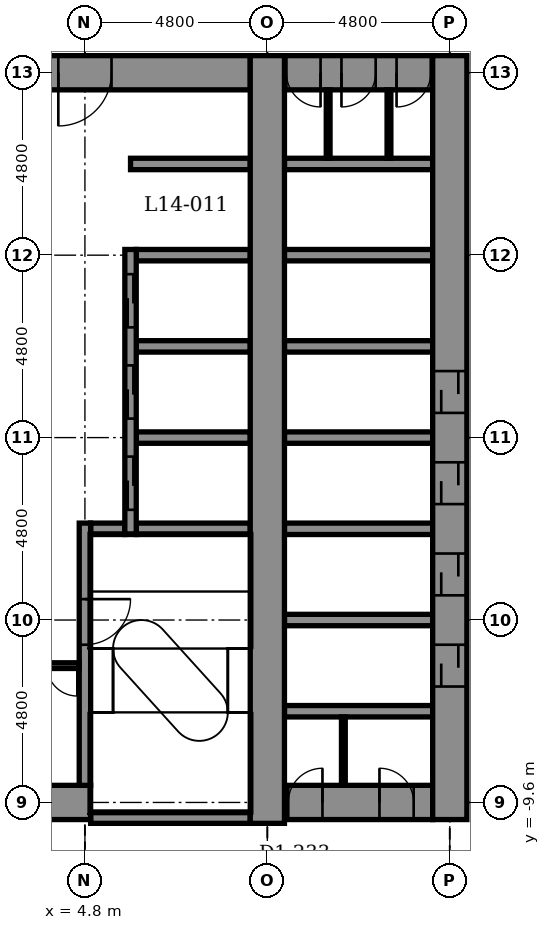
"""IFC4 building model, lengths in metres.
Left out: names, types, materials, properties, quantities, classifications, styles, units other than length and angle.
Written with IfcOpenShell. Run it as: python <this file> out.ifc"""

import sys

from ifc_helpers import new_model, si_unit, direction, frame, frame_2d, origin, place, context, subcontext, project, spatial, rectangle, extrude, element, fill, save


model = new_model("IFC4")
c1 = context("Model", 3, precision=1e-05, world=origin(), true_north=direction((0.0, 1.0)))
c2 = subcontext(c1, "Body", "Model", "MODEL_VIEW")
j1 = project(units=[si_unit("LENGTHUNIT", "METRE"), si_unit("PLANEANGLEUNIT", "RADIAN")], contexts=[c1])
p1 = place(None, origin())
s1 = spatial("IfcSite", under=j1, at=p1, CompositionType="ELEMENT")
p2 = place(p1, origin())
s2 = spatial("IfcBuilding", under=s1, at=p2, CompositionType="ELEMENT")
p3 = place(p2, frame((0.0, 0.0, 77.9)))
s3 = spatial("IfcBuildingStorey", under=s2, at=p3, CompositionType="ELEMENT", Elevation=77.9)
p4 = place(p3, frame((4.95, -10.0, -0.2), z_axis=(0.0, 0.0, 1.0), x_axis=(1.0, 0.0, 0.0)))
e1 = element("IfcWall", 1, at=p4, inside=s3, PredefinedType="STANDARD", context=c2, shape_type="SweptSolid", body=[
    extrude(rectangle(XDim=4.2, YDim=0.3, at=frame_2d((2.1, 0.0))), origin(), (0.0, 0.0, 1.0), 4.5),
])
p5 = place(p3, frame((-5.25, -9.6, -0.2), z_axis=(0.0, 0.0, 1.0), x_axis=(1.0, 0.0, 0.0)))
e2 = element("IfcWall", 2, at=p5, inside=s3, PredefinedType="SHEAR", context=c2, shape_type="SweptSolid", body=[
    extrude(rectangle(XDim=10.2, YDim=0.9, at=frame_2d((5.1, 0.0))), origin(), (0.0, 0.0, 1.0), 4.5),
])
p6 = place(p5, frame((0.6, 0.0, 0.2)))
e3 = element("IfcOpeningElement", 3, at=p6, cuts=e2, PredefinedType="OPENING", context=c2, shape_type="SweptSolid", body=[
    extrude(rectangle(XDim=0.9, YDim=2.1, at=frame_2d((0.45, 1.05))), frame((0.0, 0.46, 0.0), z_axis=(0.0, -1.0, 0.0), x_axis=(1.0, 0.0, 0.0)), (0.0, 0.0, 1.0), 0.92),
])
p7 = place(p3, frame((10.05, -9.6, -0.2), z_axis=(0.0, 0.0, 1.0), x_axis=(1.0, 0.0, 0.0)))
e4 = element("IfcWall", 4, at=p7, inside=s3, PredefinedType="SHEAR", context=c2, shape_type="SweptSolid", body=[
    extrude(rectangle(XDim=3.9, YDim=0.9, at=frame_2d((1.95, 0.0))), origin(), (0.0, 0.0, 1.0), 4.5),
])
p8 = place(p7, frame((0.1, 0.0, 0.2)))
e5 = element("IfcOpeningElement", 5, at=p8, cuts=e4, PredefinedType="OPENING", context=c2, shape_type="SweptSolid", body=[
    extrude(rectangle(XDim=0.9, YDim=2.1, at=frame_2d((0.45, 1.05))), frame((0.0, 0.46, 0.0), z_axis=(0.0, -1.0, 0.0), x_axis=(1.0, 0.0, 0.0)), (0.0, 0.0, 1.0), 0.92),
])
p9 = place(p7, frame((2.5, 0.0, 0.2)))
e6 = element("IfcOpeningElement", 6, at=p9, cuts=e4, PredefinedType="OPENING", context=c2, shape_type="SweptSolid", body=[
    extrude(rectangle(XDim=0.9, YDim=2.1, at=frame_2d((0.45, 1.05))), frame((0.0, 0.46, 0.0), z_axis=(0.0, -1.0, 0.0), x_axis=(1.0, 0.0, 0.0)), (0.0, 0.0, 1.0), 0.92),
])
for number, where, z_axis, x_axis in (
    (7, (10.05, -7.2, -0.2), (0.0, 0.0, 1.0), (1.0, 0.0, 0.0)),
    (8, (10.05, -4.8, -0.2), (0.0, 0.0, 1.0), (1.0, 0.0, 0.0)),
):
    element("IfcWall", number, at=place(p3, frame(where, z_axis=z_axis, x_axis=x_axis)), inside=s3, PredefinedType="STANDARD", context=c2, shape_type="SweptSolid", body=[
        extrude(rectangle(XDim=3.9, YDim=0.3, at=frame_2d((1.95, 0.0))), origin(), (0.0, 0.0, 1.0), 4.5),
    ])
p10 = place(p3, frame((4.95, -2.4, -0.2), z_axis=(0.0, 0.0, 1.0), x_axis=(1.0, 0.0, 0.0)))
e9 = element("IfcWall", 9, at=p10, inside=s3, PredefinedType="STANDARD", context=c2, shape_type="SweptSolid", body=[
    extrude(rectangle(XDim=0.9, YDim=0.3, at=frame_2d((0.45, 0.0))), origin(), (0.0, 0.0, 1.0), 4.5),
])
p11 = place(p3, frame((6.15, -2.4, -0.2), z_axis=(0.0, 0.0, 1.0), x_axis=(1.0, 0.0, 0.0)))
e10 = element("IfcWall", 10, at=p11, inside=s3, PredefinedType="STANDARD", context=c2, shape_type="SweptSolid", body=[
    extrude(rectangle(XDim=3.0, YDim=0.3, at=frame_2d((1.5, 0.0))), origin(), (0.0, 0.0, 1.0), 4.5),
])
p12 = place(p3, frame((10.05, -2.4, -0.2), z_axis=(0.0, 0.0, 1.0), x_axis=(1.0, 0.0, 0.0)))
e11 = element("IfcWall", 11, at=p12, inside=s3, PredefinedType="STANDARD", context=c2, shape_type="SweptSolid", body=[
    extrude(rectangle(XDim=3.9, YDim=0.3, at=frame_2d((1.95, 0.0))), origin(), (0.0, 0.0, 1.0), 4.5),
])
p13 = place(p3, frame((6.15, 0.0, -0.2), z_axis=(0.0, 0.0, 1.0), x_axis=(1.0, 0.0, 0.0)))
e12 = element("IfcWall", 12, at=p13, inside=s3, PredefinedType="STANDARD", context=c2, shape_type="SweptSolid", body=[
    extrude(rectangle(XDim=3.0, YDim=0.3, at=frame_2d((1.5, 0.0))), origin(), (0.0, 0.0, 1.0), 4.5),
])
p14 = place(p3, frame((10.05, 0.0, -0.2), z_axis=(0.0, 0.0, 1.0), x_axis=(1.0, 0.0, 0.0)))
e13 = element("IfcWall", 13, at=p14, inside=s3, PredefinedType="STANDARD", context=c2, shape_type="SweptSolid", body=[
    extrude(rectangle(XDim=3.9, YDim=0.3, at=frame_2d((1.95, 0.0))), origin(), (0.0, 0.0, 1.0), 4.5),
])
p15 = place(p3, frame((6.15, 2.4, -0.2), z_axis=(0.0, 0.0, 1.0), x_axis=(1.0, 0.0, 0.0)))
e14 = element("IfcWall", 14, at=p15, inside=s3, PredefinedType="STANDARD", context=c2, shape_type="SweptSolid", body=[
    extrude(rectangle(XDim=3.0, YDim=0.3, at=frame_2d((1.5, 0.0))), origin(), (0.0, 0.0, 1.0), 4.5),
])
p16 = place(p3, frame((10.05, 2.4, -0.2), z_axis=(0.0, 0.0, 1.0), x_axis=(1.0, 0.0, 0.0)))
e15 = element("IfcWall", 15, at=p16, inside=s3, PredefinedType="STANDARD", context=c2, shape_type="SweptSolid", body=[
    extrude(rectangle(XDim=3.9, YDim=0.3, at=frame_2d((1.95, 0.0))), origin(), (0.0, 0.0, 1.0), 4.5),
])
p17 = place(p3, frame((6.15, 4.8, -0.2), z_axis=(0.0, 0.0, 1.0), x_axis=(1.0, 0.0, 0.0)))
e16 = element("IfcWall", 16, at=p17, inside=s3, PredefinedType="STANDARD", context=c2, shape_type="SweptSolid", body=[
    extrude(rectangle(XDim=3.0, YDim=0.3, at=frame_2d((1.5, 0.0))), origin(), (0.0, 0.0, 1.0), 4.5),
])
p18 = place(p3, frame((10.05, 4.8, -0.2), z_axis=(0.0, 0.0, 1.0), x_axis=(1.0, 0.0, 0.0)))
e17 = element("IfcWall", 17, at=p18, inside=s3, PredefinedType="STANDARD", context=c2, shape_type="SweptSolid", body=[
    extrude(rectangle(XDim=3.9, YDim=0.3, at=frame_2d((1.95, 0.0))), origin(), (0.0, 0.0, 1.0), 4.5),
])
p19 = place(p3, frame((6.0, 7.2, -0.2), z_axis=(0.0, 0.0, 1.0), x_axis=(1.0, 0.0, 0.0)))
e18 = element("IfcWall", 18, at=p19, inside=s3, PredefinedType="STANDARD", context=c2, shape_type="SweptSolid", body=[
    extrude(rectangle(XDim=3.15, YDim=0.3, at=frame_2d((1.575, 0.0))), origin(), (0.0, 0.0, 1.0), 4.5),
])
p20 = place(p3, frame((10.05, 7.2, -0.2), z_axis=(0.0, 0.0, 1.0), x_axis=(1.0, 0.0, 0.0)))
e19 = element("IfcWall", 19, at=p20, inside=s3, PredefinedType="STANDARD", context=c2, shape_type="SweptSolid", body=[
    extrude(rectangle(XDim=3.9, YDim=0.3, at=frame_2d((1.95, 0.0))), origin(), (0.0, 0.0, 1.0), 4.5),
])
p21 = place(p3, frame((-5.25, 9.6, -0.2), z_axis=(0.0, 0.0, 1.0), x_axis=(1.0, 0.0, 0.0)))
e20 = element("IfcWall", 20, at=p21, inside=s3, PredefinedType="SHEAR", context=c2, shape_type="SweptSolid", body=[
    extrude(rectangle(XDim=14.4, YDim=0.9, at=frame_2d((7.2, 0.0))), origin(), (0.0, 0.0, 1.0), 4.5),
])
p22 = place(p21, frame((9.35, 0.0, 0.2)))
e21 = element("IfcOpeningElement", 21, at=p22, cuts=e20, PredefinedType="OPENING", context=c2, shape_type="SweptSolid", body=[
    extrude(rectangle(XDim=1.4, YDim=2.1, at=frame_2d((0.7, 1.05))), frame((0.0, 0.46, 0.0), z_axis=(0.0, -1.0, 0.0), x_axis=(1.0, 0.0, 0.0)), (0.0, 0.0, 1.0), 0.92),
])
p23 = place(p3, frame((10.05, 9.6, -0.2), z_axis=(0.0, 0.0, 1.0), x_axis=(1.0, 0.0, 0.0)))
e22 = element("IfcWall", 22, at=p23, inside=s3, PredefinedType="SHEAR", context=c2, shape_type="SweptSolid", body=[
    extrude(rectangle(XDim=3.9, YDim=0.9, at=frame_2d((1.95, 0.0))), origin(), (0.0, 0.0, 1.0), 4.5),
])
p24 = place(p23, frame((0.05, 0.0, 0.2)))
e23 = element("IfcOpeningElement", 23, at=p24, cuts=e22, PredefinedType="OPENING", context=c2, shape_type="SweptSolid", body=[
    extrude(rectangle(XDim=0.9, YDim=2.1, at=frame_2d((0.45, 1.05))), frame((0.0, 0.46, 0.0), z_axis=(0.0, -1.0, 0.0), x_axis=(1.0, 0.0, 0.0)), (0.0, 0.0, 1.0), 0.92),
])
p25 = place(p23, frame((1.5, 0.0, 0.2)))
e24 = element("IfcOpeningElement", 24, at=p25, cuts=e22, PredefinedType="OPENING", context=c2, shape_type="SweptSolid", body=[
    extrude(rectangle(XDim=0.9, YDim=2.1, at=frame_2d((0.45, 1.05))), frame((0.0, 0.46, 0.0), z_axis=(0.0, -1.0, 0.0), x_axis=(1.0, 0.0, 0.0)), (0.0, 0.0, 1.0), 0.92),
])
p26 = place(p23, frame((2.95, 0.0, 0.2)))
e25 = element("IfcOpeningElement", 25, at=p26, cuts=e22, PredefinedType="OPENING", context=c2, shape_type="SweptSolid", body=[
    extrude(rectangle(XDim=0.9, YDim=2.1, at=frame_2d((0.45, 1.05))), frame((0.0, 0.46, 0.0), z_axis=(0.0, -1.0, 0.0), x_axis=(1.0, 0.0, 0.0)), (0.0, 0.0, 1.0), 0.92),
])
p27 = place(p3, frame((4.8, -9.15, -0.2), z_axis=(0.0, 0.0, 1.0), x_axis=(0.0, 1.0, 0.0)))
e26 = element("IfcWall", 26, at=p27, inside=s3, PredefinedType="STANDARD", context=c2, shape_type="SweptSolid", body=[
    extrude(rectangle(XDim=6.9, YDim=0.3, at=frame_2d((3.45, 0.0))), origin(), (0.0, 0.0, 1.0), 4.5),
])
p28 = place(p27, frame((3.7, 0.0, 0.2)))
e27 = element("IfcOpeningElement", 27, at=p28, cuts=e26, PredefinedType="OPENING", context=c2, shape_type="SweptSolid", body=[
    extrude(rectangle(XDim=1.2, YDim=2.1, at=frame_2d((0.6, 1.05))), frame((0.0, 0.16, 0.0), z_axis=(0.0, -1.0, 0.0), x_axis=(1.0, 0.0, 0.0)), (0.0, 0.0, 1.0), 0.32),
])
p29 = place(p3, frame((6.0, -2.55, -0.2), z_axis=(0.0, 0.0, 1.0), x_axis=(0.0, 1.0, 0.0)))
e28 = element("IfcWall", 28, at=p29, inside=s3, PredefinedType="STANDARD", context=c2, shape_type="SweptSolid", body=[
    extrude(rectangle(XDim=7.5, YDim=0.3, at=frame_2d((3.75, 0.0))), origin(), (0.0, 0.0, 1.0), 4.5),
])
p30 = place(p29, frame((0.65, 0.0, 0.2)))
e29 = element("IfcOpeningElement", 29, at=p30, cuts=e28, PredefinedType="OPENING", context=c2, shape_type="SweptSolid", body=[
    extrude(rectangle(XDim=1.4, YDim=2.1, at=frame_2d((0.7, 1.05))), frame((0.0, 0.16, 0.0), z_axis=(0.0, -1.0, 0.0), x_axis=(1.0, 0.0, 0.0)), (0.0, 0.0, 1.0), 0.32),
])
p31 = place(p29, frame((3.05, 0.0, 0.2)))
e30 = element("IfcOpeningElement", 30, at=p31, cuts=e28, PredefinedType="OPENING", context=c2, shape_type="SweptSolid", body=[
    extrude(rectangle(XDim=1.4, YDim=2.1, at=frame_2d((0.7, 1.05))), frame((0.0, 0.16, 0.0), z_axis=(0.0, -1.0, 0.0), x_axis=(1.0, 0.0, 0.0)), (0.0, 0.0, 1.0), 0.32),
])
p32 = place(p29, frame((5.45, 0.0, 0.2)))
e31 = element("IfcOpeningElement", 31, at=p32, cuts=e28, PredefinedType="OPENING", context=c2, shape_type="SweptSolid", body=[
    extrude(rectangle(XDim=1.4, YDim=2.1, at=frame_2d((0.7, 1.05))), frame((0.0, 0.16, 0.0), z_axis=(0.0, -1.0, 0.0), x_axis=(1.0, 0.0, 0.0)), (0.0, 0.0, 1.0), 0.32),
])
p33 = place(p3, frame((9.6, -10.15, -0.2), z_axis=(0.0, 0.0, 1.0), x_axis=(0.0, 1.0, 0.0)))
e32 = element("IfcWall", 32, at=p33, inside=s3, PredefinedType="SHEAR", context=c2, shape_type="SweptSolid", body=[
    extrude(rectangle(XDim=20.2, YDim=0.9, at=frame_2d((10.1, 0.0))), origin(), (0.0, 0.0, 1.0), 4.5),
])
p34 = place(p3, frame((14.4, -10.05, -0.2), z_axis=(0.0, 0.0, 1.0), x_axis=(0.0, 1.0, 0.0)))
e33 = element("IfcWall", 33, at=p34, inside=s3, PredefinedType="SHEAR", context=c2, shape_type="SweptSolid", body=[
    extrude(rectangle(XDim=20.1, YDim=0.9, at=frame_2d((10.05, 0.0))), origin(), (0.0, 0.0, 1.0), 4.5),
])
p35 = place(p34, frame((3.5, 0.0, 0.2)))
e34 = element("IfcOpeningElement", 34, at=p35, cuts=e33, PredefinedType="OPENING", context=c2, shape_type="SweptSolid", body=[
    extrude(rectangle(XDim=1.1, YDim=2.1, at=frame_2d((0.55, 1.05))), frame((0.0, 0.46, 0.0), z_axis=(0.0, -1.0, 0.0), x_axis=(1.0, 0.0, 0.0)), (0.0, 0.0, 1.0), 0.92),
])
p36 = place(p34, frame((5.9, 0.0, 0.2)))
e35 = element("IfcOpeningElement", 35, at=p36, cuts=e33, PredefinedType="OPENING", context=c2, shape_type="SweptSolid", body=[
    extrude(rectangle(XDim=1.1, YDim=2.1, at=frame_2d((0.55, 1.05))), frame((0.0, 0.46, 0.0), z_axis=(0.0, -1.0, 0.0), x_axis=(1.0, 0.0, 0.0)), (0.0, 0.0, 1.0), 0.92),
])
p37 = place(p34, frame((8.3, 0.0, 0.2)))
e36 = element("IfcOpeningElement", 36, at=p37, cuts=e33, PredefinedType="OPENING", context=c2, shape_type="SweptSolid", body=[
    extrude(rectangle(XDim=1.1, YDim=2.1, at=frame_2d((0.55, 1.05))), frame((0.0, 0.46, 0.0), z_axis=(0.0, -1.0, 0.0), x_axis=(1.0, 0.0, 0.0)), (0.0, 0.0, 1.0), 0.92),
])
p38 = place(p34, frame((10.7, 0.0, 0.2)))
e37 = element("IfcOpeningElement", 37, at=p38, cuts=e33, PredefinedType="OPENING", context=c2, shape_type="SweptSolid", body=[
    extrude(rectangle(XDim=1.1, YDim=2.1, at=frame_2d((0.55, 1.05))), frame((0.0, 0.46, 0.0), z_axis=(0.0, -1.0, 0.0), x_axis=(1.0, 0.0, 0.0)), (0.0, 0.0, 1.0), 0.92),
])
for number, where, z_axis, x_axis in (
    (38, (12.8, 7.35, 0.0), (0.0, 0.0, 1.0), (0.0, 1.0, 0.0)),
    (39, (11.6, -9.15, 0.0), (0.0, 0.0, 1.0), (0.0, 1.0, 0.0)),
    (40, (11.2, 7.35, 0.0), (0.0, 0.0, 1.0), (0.0, 1.0, 0.0)),
):
    element("IfcWall", number, at=place(p3, frame(where, z_axis=z_axis, x_axis=x_axis)), inside=s3, PredefinedType="PARTITIONING", context=c2, shape_type="SweptSolid", body=[
        extrude(rectangle(XDim=1.8, YDim=0.1, at=frame_2d((0.9, 0.0))), origin(), (0.0, 0.0, 1.0), 4.3),
    ])
p39 = place(p3, frame((3.75, -6.0, 0.0), z_axis=(0.0, 0.0, 1.0), x_axis=(1.0, 0.0, 0.0)))
e41 = element("IfcWall", 41, at=p39, inside=s3, PredefinedType="PARTITIONING", context=c2, shape_type="SweptSolid", body=[
    extrude(rectangle(XDim=0.9, YDim=0.15, at=frame_2d((0.45, 0.0))), origin(), (0.0, 0.0, 1.0), 4.3),
])
p40 = place(p39, frame((0.05, 0.0, 0.0)))
e42 = element("IfcOpeningElement", 42, at=p40, cuts=e41, PredefinedType="OPENING", context=c2, shape_type="SweptSolid", body=[
    extrude(rectangle(XDim=0.8, YDim=2.1, at=frame_2d((0.4, 1.05))), frame((0.0, 0.085, 0.0), z_axis=(0.0, -1.0, 0.0), x_axis=(1.0, 0.0, 0.0)), (0.0, 0.0, 1.0), 0.17),
])
p41 = place(p40, frame((0.8, 0.0, 0.0), z_axis=(0.0, 0.0, 1.0), x_axis=(-1.0, 0.0, 0.0)))
e43 = element("IfcDoor", 43, at=p41, inside=s3, OperationType="SINGLE_SWING_RIGHT", PredefinedType="DOOR", context=c2, shape_type="SweptSolid", body=[
    extrude(rectangle(XDim=0.8, YDim=2.1, at=frame_2d((0.4, 1.05))), frame((0.0, 0.025, 0.0), z_axis=(0.0, -1.0, 0.0), x_axis=(1.0, 0.0, 0.0)), (0.0, 0.0, 1.0), 0.05),
])
fill(e42, e43)
p42 = place(p30, origin())
e44 = element("IfcDoor", 44, at=p42, inside=s3, OperationType="DOUBLE_DOOR_SLIDING", PredefinedType="DOOR", context=c2, shape_type="SweptSolid", body=[
    extrude(rectangle(XDim=1.4, YDim=2.1, at=frame_2d((0.7, 1.05))), frame((0.0, 0.025, 0.0), z_axis=(0.0, -1.0, 0.0), x_axis=(1.0, 0.0, 0.0)), (0.0, 0.0, 1.0), 0.05),
])
fill(e29, e44)
p43 = place(p31, origin())
e45 = element("IfcDoor", 45, at=p43, inside=s3, OperationType="DOUBLE_DOOR_SLIDING", PredefinedType="DOOR", context=c2, shape_type="SweptSolid", body=[
    extrude(rectangle(XDim=1.4, YDim=2.1, at=frame_2d((0.7, 1.05))), frame((0.0, 0.025, 0.0), z_axis=(0.0, -1.0, 0.0), x_axis=(1.0, 0.0, 0.0)), (0.0, 0.0, 1.0), 0.05),
])
fill(e30, e45)
p44 = place(p32, origin())
e46 = element("IfcDoor", 46, at=p44, inside=s3, OperationType="DOUBLE_DOOR_SLIDING", PredefinedType="DOOR", context=c2, shape_type="SweptSolid", body=[
    extrude(rectangle(XDim=1.4, YDim=2.1, at=frame_2d((0.7, 1.05))), frame((0.0, 0.025, 0.0), z_axis=(0.0, -1.0, 0.0), x_axis=(1.0, 0.0, 0.0)), (0.0, 0.0, 1.0), 0.05),
])
fill(e31, e46)
p45 = place(p35, origin())
e47 = element("IfcDoor", 47, at=p45, inside=s3, OperationType="DOUBLE_DOOR_SLIDING", PredefinedType="DOOR", context=c2, shape_type="SweptSolid", body=[
    extrude(rectangle(XDim=1.1, YDim=2.1, at=frame_2d((0.55, 1.05))), frame((0.0, 0.025, 0.0), z_axis=(0.0, -1.0, 0.0), x_axis=(1.0, 0.0, 0.0)), (0.0, 0.0, 1.0), 0.05),
])
fill(e34, e47)
p46 = place(p36, origin())
e48 = element("IfcDoor", 48, at=p46, inside=s3, OperationType="DOUBLE_DOOR_SLIDING", PredefinedType="DOOR", context=c2, shape_type="SweptSolid", body=[
    extrude(rectangle(XDim=1.1, YDim=2.1, at=frame_2d((0.55, 1.05))), frame((0.0, 0.025, 0.0), z_axis=(0.0, -1.0, 0.0), x_axis=(1.0, 0.0, 0.0)), (0.0, 0.0, 1.0), 0.05),
])
fill(e35, e48)
p47 = place(p37, origin())
e49 = element("IfcDoor", 49, at=p47, inside=s3, OperationType="DOUBLE_DOOR_SLIDING", PredefinedType="DOOR", context=c2, shape_type="SweptSolid", body=[
    extrude(rectangle(XDim=1.1, YDim=2.1, at=frame_2d((0.55, 1.05))), frame((0.0, 0.025, 0.0), z_axis=(0.0, -1.0, 0.0), x_axis=(1.0, 0.0, 0.0)), (0.0, 0.0, 1.0), 0.05),
])
fill(e36, e49)
p48 = place(p38, origin())
e50 = element("IfcDoor", 50, at=p48, inside=s3, OperationType="DOUBLE_DOOR_SLIDING", PredefinedType="DOOR", context=c2, shape_type="SweptSolid", body=[
    extrude(rectangle(XDim=1.1, YDim=2.1, at=frame_2d((0.55, 1.05))), frame((0.0, 0.025, 0.0), z_axis=(0.0, -1.0, 0.0), x_axis=(1.0, 0.0, 0.0)), (0.0, 0.0, 1.0), 0.05),
])
fill(e37, e50)
p49 = place(p28, frame((1.2, 0.0, 0.0), z_axis=(0.0, 0.0, 1.0), x_axis=(-1.0, 0.0, 0.0)))
e51 = element("IfcDoor", 51, at=p49, inside=s3, OperationType="SINGLE_SWING_RIGHT", PredefinedType="DOOR", context=c2, shape_type="SweptSolid", body=[
    extrude(rectangle(XDim=1.2, YDim=2.1, at=frame_2d((0.6, 1.05))), frame((0.0, 0.025, 0.0), z_axis=(0.0, -1.0, 0.0), x_axis=(1.0, 0.0, 0.0)), (0.0, 0.0, 1.0), 0.05),
])
fill(e27, e51)
p50 = place(p8, origin())
e52 = element("IfcDoor", 52, at=p50, inside=s3, OperationType="SINGLE_SWING_RIGHT", PredefinedType="DOOR", context=c2, shape_type="SweptSolid", body=[
    extrude(rectangle(XDim=0.9, YDim=2.1, at=frame_2d((0.45, 1.05))), frame((0.0, 0.025, 0.0), z_axis=(0.0, -1.0, 0.0), x_axis=(1.0, 0.0, 0.0)), (0.0, 0.0, 1.0), 0.05),
])
fill(e5, e52)
p51 = place(p9, origin())
e53 = element("IfcDoor", 53, at=p51, inside=s3, OperationType="SINGLE_SWING_LEFT", PredefinedType="DOOR", context=c2, shape_type="SweptSolid", body=[
    extrude(rectangle(XDim=0.9, YDim=2.1, at=frame_2d((0.45, 1.05))), frame((0.0, 0.025, 0.0), z_axis=(0.0, -1.0, 0.0), x_axis=(1.0, 0.0, 0.0)), (0.0, 0.0, 1.0), 0.05),
])
fill(e6, e53)
p52 = place(p24, frame((0.9, 0.0, 0.0), z_axis=(0.0, 0.0, 1.0), x_axis=(-1.0, 0.0, 0.0)))
e54 = element("IfcDoor", 54, at=p52, inside=s3, OperationType="SINGLE_SWING_RIGHT", PredefinedType="DOOR", context=c2, shape_type="SweptSolid", body=[
    extrude(rectangle(XDim=0.9, YDim=2.1, at=frame_2d((0.45, 1.05))), frame((0.0, 0.025, 0.0), z_axis=(0.0, -1.0, 0.0), x_axis=(1.0, 0.0, 0.0)), (0.0, 0.0, 1.0), 0.05),
])
fill(e23, e54)
p53 = place(p25, frame((0.9, 0.0, 0.0), z_axis=(0.0, 0.0, 1.0), x_axis=(-1.0, 0.0, 0.0)))
e55 = element("IfcDoor", 55, at=p53, inside=s3, OperationType="SINGLE_SWING_LEFT", PredefinedType="DOOR", context=c2, shape_type="SweptSolid", body=[
    extrude(rectangle(XDim=0.9, YDim=2.1, at=frame_2d((0.45, 1.05))), frame((0.0, 0.025, 0.0), z_axis=(0.0, -1.0, 0.0), x_axis=(1.0, 0.0, 0.0)), (0.0, 0.0, 1.0), 0.05),
])
fill(e24, e55)
p54 = place(p26, frame((0.9, 0.0, 0.0), z_axis=(0.0, 0.0, 1.0), x_axis=(-1.0, 0.0, 0.0)))
e56 = element("IfcDoor", 56, at=p54, inside=s3, OperationType="SINGLE_SWING_LEFT", PredefinedType="DOOR", context=c2, shape_type="SweptSolid", body=[
    extrude(rectangle(XDim=0.9, YDim=2.1, at=frame_2d((0.45, 1.05))), frame((0.0, 0.025, 0.0), z_axis=(0.0, -1.0, 0.0), x_axis=(1.0, 0.0, 0.0)), (0.0, 0.0, 1.0), 0.05),
])
fill(e25, e56)
p55 = place(p22, frame((1.4, 0.0, 0.0), z_axis=(0.0, 0.0, 1.0), x_axis=(-1.0, 0.0, 0.0)))
e57 = element("IfcDoor", 57, at=p55, inside=s3, OperationType="SINGLE_SWING_LEFT", PredefinedType="DOOR", context=c2, shape_type="SweptSolid", body=[
    extrude(rectangle(XDim=1.4, YDim=2.1, at=frame_2d((0.7, 1.05))), frame((0.0, 0.025, 0.0), z_axis=(0.0, -1.0, 0.0), x_axis=(1.0, 0.0, 0.0)), (0.0, 0.0, 1.0), 0.05),
])
fill(e21, e57)
save(model, sys.argv[1])
